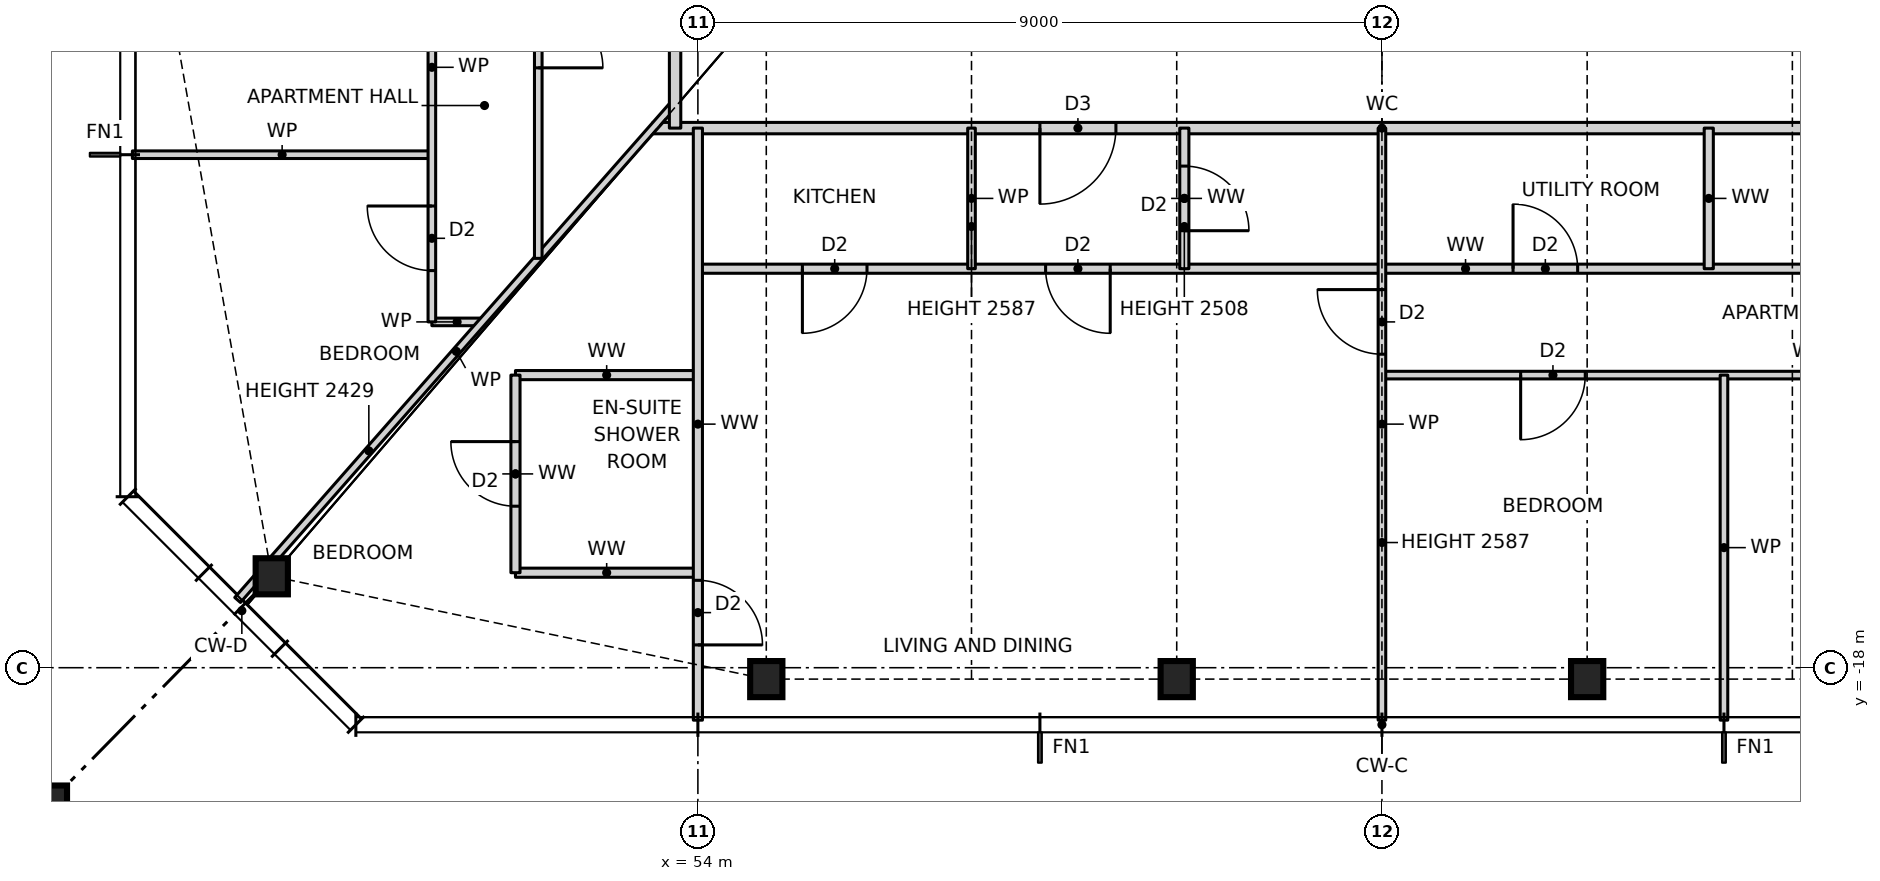
"""IFC4 building model, lengths in metres.
Left out: names, types, materials, properties, quantities, classifications, styles, units other than length and angle.
Written with IfcOpenShell. Run it as: python <this file> out.ifc"""

import sys

from ifc_helpers import new_model, si_unit, direction, frame, frame_2d, origin, origin_2d, place, context, subcontext, project, spatial, rectangle, hollow_rectangle, i_section, extrude, element, fill, save


model = new_model("IFC4")
c1 = context("Model", 3, precision=1e-05, world=origin(), true_north=direction((0.0, 1.0)))
c2 = subcontext(c1, "Body", "Model", "MODEL_VIEW")
j1 = project(units=[si_unit("LENGTHUNIT", "METRE"), si_unit("PLANEANGLEUNIT", "RADIAN")], contexts=[c1])
p1 = place(None, origin())
s1 = spatial("IfcSite", under=j1, at=p1, CompositionType="ELEMENT")
p2 = place(p1, origin())
s2 = spatial("IfcBuilding", under=s1, at=p2, CompositionType="ELEMENT")
p3 = place(p2, frame((0.0, 0.0, 22.0)))
s3 = spatial("IfcBuildingStorey", under=s2, at=p3, CompositionType="ELEMENT", Elevation=22.0)
for number, where, z_axis, x_axis in (
    (1, (48.394, -16.797, 0.0), (0.0, 0.0, 1.0), (1.0, 0.0, 0.0)),
    (2, (54.9, -18.15, 0.0), (0.0, 0.0, 1.0), (1.0, 0.0, 0.0)),
    (3, (60.3, -18.15, 0.0), (0.0, 0.0, 1.0), (1.0, 0.0, 0.0)),
    (4, (65.7, -18.15, 0.0), (0.0, 0.0, 1.0), (1.0, 0.0, 0.0)),
):
    element("IfcColumn", number, at=place(p3, frame(where, z_axis=z_axis, x_axis=x_axis)), inside=s3, PredefinedType="COLUMN", context=c2, shape_type="SweptSolid", body=[
        extrude(i_section(OverallWidth=0.424, OverallDepth=0.475, WebThickness=0.048, FlangeThickness=0.077, at=origin_2d()), origin(), (0.0, 0.0, 1.0), 3.5),
    ])
p4 = place(p3, frame((45.1, -20.15, 0.0), z_axis=(0.0, 0.0, 1.0), x_axis=(1.0, 0.0, 0.0)))
e5 = element("IfcColumn", 5, at=p4, inside=s3, PredefinedType="COLUMN", context=c2, shape_type="SweptSolid", body=[
    extrude(hollow_rectangle(XDim=1.2, YDim=1.2, WallThickness=0.07, at=origin_2d()), origin(), (0.0, 0.0, 1.0), 3.5),
])
for number, where, z_axis, x_axis in (
    (6, (51.6, -16.75, 0.0), (0.0, 0.0, 1.0), (1.0, 0.0, 0.0)),
    (7, (51.6, -14.15, 0.0), (0.0, 0.0, 1.0), (1.0, 0.0, 0.0)),
):
    element("IfcWall", number, at=place(p3, frame(where, z_axis=z_axis, x_axis=x_axis)), inside=s3, PredefinedType="PARTITIONING", context=c2, shape_type="SweptSolid", body=[
        extrude(rectangle(XDim=2.4, YDim=0.12, at=frame_2d((1.2, 0.0))), origin(), (0.0, 0.0, 1.0), 3.27),
    ])
p5 = place(p3, frame((63.0, -14.15, 0.0), z_axis=(0.0, 0.0, 1.0), x_axis=(1.0, 0.0, 0.0)))
e8 = element("IfcWall", 8, at=p5, inside=s3, PredefinedType="PARTITIONING", context=c2, shape_type="SweptSolid", body=[
    extrude(rectangle(XDim=11.2, YDim=0.1, at=frame_2d((5.6, 0.0))), origin(), (0.0, 0.0, 1.0), 3.27),
])
p6 = place(p5, frame((1.825, 0.0, 0.0)))
e9 = element("IfcOpeningElement", 9, at=p6, cuts=e8, PredefinedType="OPENING", context=c2, shape_type="SweptSolid", body=[
    extrude(rectangle(XDim=0.85, YDim=2.1, at=frame_2d((0.425, 1.05))), frame((0.0, 0.06, 0.0), z_axis=(0.0, -1.0, 0.0), x_axis=(1.0, 0.0, 0.0)), (0.0, 0.0, 1.0), 0.12),
])
p7 = place(p5, frame((6.325, 0.0, 0.0)))
e10 = element("IfcOpeningElement", 10, at=p7, cuts=e8, PredefinedType="OPENING", context=c2, shape_type="SweptSolid", body=[
    extrude(rectangle(XDim=0.85, YDim=2.1, at=frame_2d((0.425, 1.05))), frame((0.0, 0.06, 0.0), z_axis=(0.0, -1.0, 0.0), x_axis=(1.0, 0.0, 0.0)), (0.0, 0.0, 1.0), 0.12),
])
p8 = place(p5, frame((9.675, 0.0, 0.0)))
e11 = element("IfcOpeningElement", 11, at=p8, cuts=e8, PredefinedType="OPENING", context=c2, shape_type="SweptSolid", body=[
    extrude(rectangle(XDim=0.85, YDim=2.1, at=frame_2d((0.425, 1.05))), frame((0.0, 0.06, 0.0), z_axis=(0.0, -1.0, 0.0), x_axis=(1.0, 0.0, 0.0)), (0.0, 0.0, 1.0), 0.12),
])
p9 = place(p3, frame((50.5, -13.45, 0.0), z_axis=(0.0, 0.0, 1.0), x_axis=(1.0, 0.0, 0.0)))
e12 = element("IfcWall", 12, at=p9, inside=s3, PredefinedType="PARTITIONING", context=c2, shape_type="SweptSolid", body=[
    extrude(rectangle(XDim=0.664, YDim=0.1, at=frame_2d((0.332, 0.0))), origin(), (0.0, 0.0, 1.0), 3.27),
])
p10 = place(p3, frame((54.0, -12.75, 0.0), z_axis=(0.0, 0.0, 1.0), x_axis=(1.0, 0.0, 0.0)))
e13 = element("IfcWall", 13, at=p10, inside=s3, PredefinedType="PARTITIONING", context=c2, shape_type="SweptSolid", body=[
    extrude(rectangle(XDim=20.2, YDim=0.12, at=frame_2d((10.1, 0.0))), origin(), (0.0, 0.0, 1.0), 3.27),
])
p11 = place(p10, frame((1.375, 0.0, 0.0)))
e14 = element("IfcOpeningElement", 14, at=p11, cuts=e13, PredefinedType="OPENING", context=c2, shape_type="SweptSolid", body=[
    extrude(rectangle(XDim=0.85, YDim=2.1, at=frame_2d((0.425, 1.05))), frame((0.0, 0.07, 0.0), z_axis=(0.0, -1.0, 0.0), x_axis=(1.0, 0.0, 0.0)), (0.0, 0.0, 1.0), 0.14),
])
p12 = place(p10, frame((4.575, 0.0, 0.0)))
e15 = element("IfcOpeningElement", 15, at=p12, cuts=e13, PredefinedType="OPENING", context=c2, shape_type="SweptSolid", body=[
    extrude(rectangle(XDim=0.85, YDim=2.1, at=frame_2d((0.425, 1.05))), frame((0.0, 0.07, 0.0), z_axis=(0.0, -1.0, 0.0), x_axis=(1.0, 0.0, 0.0)), (0.0, 0.0, 1.0), 0.14),
])
p13 = place(p10, frame((10.725, 0.0, 0.0)))
e16 = element("IfcOpeningElement", 16, at=p13, cuts=e13, PredefinedType="OPENING", context=c2, shape_type="SweptSolid", body=[
    extrude(rectangle(XDim=0.85, YDim=2.1, at=frame_2d((0.425, 1.05))), frame((0.0, 0.07, 0.0), z_axis=(0.0, -1.0, 0.0), x_axis=(1.0, 0.0, 0.0)), (0.0, 0.0, 1.0), 0.14),
])
p14 = place(p10, frame((16.325, 0.0, 0.0)))
e17 = element("IfcOpeningElement", 17, at=p14, cuts=e13, PredefinedType="OPENING", context=c2, shape_type="SweptSolid", body=[
    extrude(rectangle(XDim=0.85, YDim=2.1, at=frame_2d((0.425, 1.05))), frame((0.0, 0.07, 0.0), z_axis=(0.0, -1.0, 0.0), x_axis=(1.0, 0.0, 0.0)), (0.0, 0.0, 1.0), 0.14),
])
p15 = place(p3, frame((46.56, -11.25, 0.0), z_axis=(0.0, 0.0, 1.0), x_axis=(1.0, 0.0, 0.0)))
e18 = element("IfcWall", 18, at=p15, inside=s3, PredefinedType="PARTITIONING", context=c2, shape_type="SweptSolid", body=[
    extrude(rectangle(XDim=3.94, YDim=0.1, at=frame_2d((1.97, 0.0))), origin(), (0.0, 0.0, 1.0), 3.27),
])
p16 = place(p3, frame((53.408, -10.9, 0.0), z_axis=(0.0, 0.0, 1.0), x_axis=(1.0, 0.0, 0.0)))
e19 = element("IfcWall", 19, at=p16, inside=s3, PredefinedType="PARTITIONING", context=c2, shape_type="SweptSolid", body=[
    extrude(rectangle(XDim=19.184, YDim=0.15, at=frame_2d((9.592, 0.0))), origin(), (0.0, 0.0, 1.0), 3.27),
])
p17 = place(p16, frame((5.092, 0.0, 0.0)))
e20 = element("IfcOpeningElement", 20, at=p17, cuts=e19, PredefinedType="OPENING", context=c2, shape_type="SweptSolid", body=[
    extrude(rectangle(XDim=1.0, YDim=2.1, at=frame_2d((0.5, 1.05))), frame((0.0, 0.085, 0.0), z_axis=(0.0, -1.0, 0.0), x_axis=(1.0, 0.0, 0.0)), (0.0, 0.0, 1.0), 0.17),
])
p18 = place(p3, frame((47.944, -17.109, 0.0), z_axis=(0.0, 0.0, 1.0), x_axis=(0.660612734851, 0.750726857487, 0.0)))
e21 = element("IfcWall", 21, at=p18, inside=s3, PredefinedType="PARTITIONING", context=c2, shape_type="SweptSolid", body=[
    extrude(rectangle(XDim=8.713, YDim=0.1, at=frame_2d((4.356, 0.0))), origin(), (0.0, 0.0, 1.0), 2.429),
])
p19 = place(p3, frame((67.5, -18.69, 0.0), z_axis=(0.0, 0.0, 1.0), x_axis=(0.0, 1.0, 0.0)))
e22 = element("IfcWall", 22, at=p19, inside=s3, PredefinedType="PARTITIONING", context=c2, shape_type="SweptSolid", body=[
    extrude(rectangle(XDim=4.54, YDim=0.1, at=frame_2d((2.27, 0.0))), origin(), (0.0, 0.0, 1.0), 3.27),
])
p20 = place(p3, frame((67.3, -12.75, 0.0), z_axis=(0.0, 0.0, 1.0), x_axis=(0.0, 1.0, 0.0)))
e23 = element("IfcWall", 23, at=p20, inside=s3, PredefinedType="PARTITIONING", context=c2, shape_type="SweptSolid", body=[
    extrude(rectangle(XDim=1.85, YDim=0.12, at=frame_2d((0.925, 0.0))), origin(), (0.0, 0.0, 1.0), 3.27),
])
p21 = place(p3, frame((63.0, -18.69, 0.0), z_axis=(0.0, 0.0, 1.0), x_axis=(0.0, 1.0, 0.0)))
e24 = element("IfcWall", 24, at=p21, inside=s3, PredefinedType="PARTITIONING", context=c2, shape_type="SweptSolid", body=[
    extrude(rectangle(XDim=7.79, YDim=0.1, at=frame_2d((3.895, 0.0))), origin(), (0.0, 0.0, 1.0), 2.587),
])
p22 = place(p21, frame((4.815, 0.0, 0.0)))
e25 = element("IfcOpeningElement", 25, at=p22, cuts=e24, PredefinedType="OPENING", context=c2, shape_type="SweptSolid", body=[
    extrude(rectangle(XDim=0.85, YDim=2.1, at=frame_2d((0.425, 1.05))), frame((0.0, 0.06, 0.0), z_axis=(0.0, -1.0, 0.0), x_axis=(1.0, 0.0, 0.0)), (0.0, 0.0, 1.0), 0.12),
])
p23 = place(p3, frame((60.4, -12.75, 0.0), z_axis=(0.0, 0.0, 1.0), x_axis=(0.0, 1.0, 0.0)))
e26 = element("IfcWall", 26, at=p23, inside=s3, PredefinedType="PARTITIONING", context=c2, shape_type="SweptSolid", body=[
    extrude(rectangle(XDim=1.85, YDim=0.12, at=frame_2d((0.925, 0.0))), origin(), (0.0, 0.0, 1.0), 2.508),
])
p24 = place(p23, frame((0.5, 0.0, 0.0)))
e27 = element("IfcOpeningElement", 27, at=p24, cuts=e26, PredefinedType="OPENING", context=c2, shape_type="SweptSolid", body=[
    extrude(rectangle(XDim=0.85, YDim=2.1, at=frame_2d((0.425, 1.05))), frame((0.0, 0.07, 0.0), z_axis=(0.0, -1.0, 0.0), x_axis=(1.0, 0.0, 0.0)), (0.0, 0.0, 1.0), 0.14),
])
p25 = place(p3, frame((57.6, -12.75, 0.0), z_axis=(0.0, 0.0, 1.0), x_axis=(0.0, 1.0, 0.0)))
e28 = element("IfcWall", 28, at=p25, inside=s3, PredefinedType="PARTITIONING", context=c2, shape_type="SweptSolid", body=[
    extrude(rectangle(XDim=1.85, YDim=0.1, at=frame_2d((0.925, 0.0))), origin(), (0.0, 0.0, 1.0), 2.587),
])
p26 = place(p3, frame((54.0, -18.69, 0.0), z_axis=(0.0, 0.0, 1.0), x_axis=(0.0, 1.0, 0.0)))
e29 = element("IfcWall", 29, at=p26, inside=s3, PredefinedType="PARTITIONING", context=c2, shape_type="SweptSolid", body=[
    extrude(rectangle(XDim=7.79, YDim=0.12, at=frame_2d((3.895, 0.0))), origin(), (0.0, 0.0, 1.0), 3.27),
])
p27 = place(p26, frame((0.99, 0.0, 0.0)))
e30 = element("IfcOpeningElement", 30, at=p27, cuts=e29, PredefinedType="OPENING", context=c2, shape_type="SweptSolid", body=[
    extrude(rectangle(XDim=0.85, YDim=2.1, at=frame_2d((0.425, 1.05))), frame((0.0, 0.07, 0.0), z_axis=(0.0, -1.0, 0.0), x_axis=(1.0, 0.0, 0.0)), (0.0, 0.0, 1.0), 0.14),
])
p28 = place(p3, frame((53.7, -10.9, 0.0), z_axis=(0.0, 0.0, 1.0), x_axis=(0.0, 1.0, 0.0)))
e31 = element("IfcWall", 31, at=p28, inside=s3, PredefinedType="PARTITIONING", context=c2, shape_type="SweptSolid", body=[
    extrude(rectangle(XDim=21.468, YDim=0.15, at=frame_2d((10.734, 0.0))), origin(), (0.0, 0.0, 1.0), 3.27),
])
p29 = place(p28, frame((7.65, 0.0, 0.0)))
e32 = element("IfcOpeningElement", 32, at=p29, cuts=e31, PredefinedType="OPENING", context=c2, shape_type="SweptSolid", body=[
    extrude(rectangle(XDim=1.0, YDim=2.1, at=frame_2d((0.5, 1.05))), frame((0.0, 0.085, 0.0), z_axis=(0.0, -1.0, 0.0), x_axis=(1.0, 0.0, 0.0)), (0.0, 0.0, 1.0), 0.17),
])
p30 = place(p3, frame((51.9, -12.614, 0.0), z_axis=(0.0, 0.0, 1.0), x_axis=(0.0, 1.0, 0.0)))
e33 = element("IfcWall", 33, at=p30, inside=s3, PredefinedType="PARTITIONING", context=c2, shape_type="SweptSolid", body=[
    extrude(rectangle(XDim=25.228, YDim=0.1, at=frame_2d((12.614, 0.0))), origin(), (0.0, 0.0, 1.0), 3.27),
])
p31 = place(p30, frame((12.639, 0.0, 0.0)))
e34 = element("IfcOpeningElement", 34, at=p31, cuts=e33, PredefinedType="OPENING", context=c2, shape_type="SweptSolid", body=[
    extrude(rectangle(XDim=0.85, YDim=2.1, at=frame_2d((0.425, 1.05))), frame((0.0, 0.06, 0.0), z_axis=(0.0, -1.0, 0.0), x_axis=(1.0, 0.0, 0.0)), (0.0, 0.0, 1.0), 0.12),
])
p32 = place(p30, frame((9.439, 0.0, 0.0)))
e35 = element("IfcOpeningElement", 35, at=p32, cuts=e33, PredefinedType="OPENING", context=c2, shape_type="SweptSolid", body=[
    extrude(rectangle(XDim=0.85, YDim=2.1, at=frame_2d((0.425, 1.05))), frame((0.0, 0.06, 0.0), z_axis=(0.0, -1.0, 0.0), x_axis=(1.0, 0.0, 0.0)), (0.0, 0.0, 1.0), 0.12),
])
p33 = place(p30, frame((16.639, 0.0, 0.0)))
e36 = element("IfcOpeningElement", 36, at=p33, cuts=e33, PredefinedType="OPENING", context=c2, shape_type="SweptSolid", body=[
    extrude(rectangle(XDim=0.85, YDim=2.1, at=frame_2d((0.425, 1.05))), frame((0.0, 0.06, 0.0), z_axis=(0.0, -1.0, 0.0), x_axis=(1.0, 0.0, 0.0)), (0.0, 0.0, 1.0), 0.12),
])
p34 = place(p30, frame((21.821, 0.0, 0.0)))
e37 = element("IfcOpeningElement", 37, at=p34, cuts=e33, PredefinedType="OPENING", context=c2, shape_type="SweptSolid", body=[
    extrude(rectangle(XDim=0.85, YDim=2.1, at=frame_2d((0.425, 1.05))), frame((0.0, 0.06, 0.0), z_axis=(0.0, -1.0, 0.0), x_axis=(1.0, 0.0, 0.0)), (0.0, 0.0, 1.0), 0.12),
])
p35 = place(p30, frame((2.507, 0.0, 0.0)))
e38 = element("IfcOpeningElement", 38, at=p35, cuts=e33, PredefinedType="OPENING", context=c2, shape_type="SweptSolid", body=[
    extrude(rectangle(XDim=0.85, YDim=2.1, at=frame_2d((0.425, 1.05))), frame((0.0, 0.06, 0.0), z_axis=(0.0, -1.0, 0.0), x_axis=(1.0, 0.0, 0.0)), (0.0, 0.0, 1.0), 0.12),
])
p36 = place(p3, frame((51.6, -16.75, 0.0), z_axis=(0.0, 0.0, 1.0), x_axis=(0.0, 1.0, 0.0)))
e39 = element("IfcWall", 39, at=p36, inside=s3, PredefinedType="PARTITIONING", context=c2, shape_type="SweptSolid", body=[
    extrude(rectangle(XDim=2.6, YDim=0.12, at=frame_2d((1.3, 0.0))), origin(), (0.0, 0.0, 1.0), 3.27),
])
p37 = place(p36, frame((0.875, 0.0, 0.0)))
e40 = element("IfcOpeningElement", 40, at=p37, cuts=e39, PredefinedType="OPENING", context=c2, shape_type="SweptSolid", body=[
    extrude(rectangle(XDim=0.85, YDim=2.1, at=frame_2d((0.425, 1.05))), frame((0.0, 0.07, 0.0), z_axis=(0.0, -1.0, 0.0), x_axis=(1.0, 0.0, 0.0)), (0.0, 0.0, 1.0), 0.14),
])
p38 = place(p3, frame((50.5, -13.45, 0.0), z_axis=(0.0, 0.0, 1.0), x_axis=(0.0, 1.0, 0.0)))
e41 = element("IfcWall", 41, at=p38, inside=s3, PredefinedType="PARTITIONING", context=c2, shape_type="SweptSolid", body=[
    extrude(rectangle(XDim=6.7, YDim=0.1, at=frame_2d((3.35, 0.0))), origin(), (0.0, 0.0, 1.0), 3.27),
])
p39 = place(p38, frame((4.025, 0.0, 0.0)))
e42 = element("IfcOpeningElement", 42, at=p39, cuts=e41, PredefinedType="OPENING", context=c2, shape_type="SweptSolid", body=[
    extrude(rectangle(XDim=0.85, YDim=2.1, at=frame_2d((0.425, 1.05))), frame((0.0, 0.06, 0.0), z_axis=(0.0, -1.0, 0.0), x_axis=(1.0, 0.0, 0.0)), (0.0, 0.0, 1.0), 0.12),
])
p40 = place(p38, frame((0.675, 0.0, 0.0)))
e43 = element("IfcOpeningElement", 43, at=p40, cuts=e41, PredefinedType="OPENING", context=c2, shape_type="SweptSolid", body=[
    extrude(rectangle(XDim=0.85, YDim=2.1, at=frame_2d((0.425, 1.05))), frame((0.0, 0.06, 0.0), z_axis=(0.0, -1.0, 0.0), x_axis=(1.0, 0.0, 0.0)), (0.0, 0.0, 1.0), 0.12),
])
p41 = place(p11, frame((0.85, 0.0, 0.0), z_axis=(0.0, 0.0, 1.0), x_axis=(-1.0, 0.0, 0.0)))
e44 = element("IfcDoor", 44, at=p41, inside=s3, OperationType="SINGLE_SWING_RIGHT", PredefinedType="DOOR", context=c2, shape_type="SweptSolid", body=[
    extrude(rectangle(XDim=0.85, YDim=2.1, at=frame_2d((0.425, 1.05))), frame((0.0, 0.025, 0.0), z_axis=(0.0, -1.0, 0.0), x_axis=(1.0, 0.0, 0.0)), (0.0, 0.0, 1.0), 0.05),
])
fill(e14, e44)
p42 = place(p17, frame((1.0, 0.0, 0.0), z_axis=(0.0, 0.0, 1.0), x_axis=(-1.0, 0.0, 0.0)))
e45 = element("IfcDoor", 45, at=p42, inside=s3, OperationType="SINGLE_SWING_RIGHT", PredefinedType="DOOR", context=c2, shape_type="SweptSolid", body=[
    extrude(rectangle(XDim=1.0, YDim=2.1, at=frame_2d((0.5, 1.05))), frame((0.0, 0.025, 0.0), z_axis=(0.0, -1.0, 0.0), x_axis=(1.0, 0.0, 0.0)), (0.0, 0.0, 1.0), 0.05),
])
fill(e20, e45)
p43 = place(p12, frame((0.85, 0.0, 0.0), z_axis=(0.0, 0.0, 1.0), x_axis=(-1.0, 0.0, 0.0)))
e46 = element("IfcDoor", 46, at=p43, inside=s3, OperationType="SINGLE_SWING_LEFT", PredefinedType="DOOR", context=c2, shape_type="SweptSolid", body=[
    extrude(rectangle(XDim=0.85, YDim=2.1, at=frame_2d((0.425, 1.05))), frame((0.0, 0.025, 0.0), z_axis=(0.0, -1.0, 0.0), x_axis=(1.0, 0.0, 0.0)), (0.0, 0.0, 1.0), 0.05),
])
fill(e15, e46)
p44 = place(p24, frame((0.85, 0.0, 0.0), z_axis=(0.0, 0.0, 1.0), x_axis=(-1.0, 0.0, 0.0)))
e47 = element("IfcDoor", 47, at=p44, inside=s3, OperationType="SINGLE_SWING_RIGHT", PredefinedType="DOOR", context=c2, shape_type="SweptSolid", body=[
    extrude(rectangle(XDim=0.85, YDim=2.1, at=frame_2d((0.425, 1.05))), frame((0.0, 0.025, 0.0), z_axis=(0.0, -1.0, 0.0), x_axis=(1.0, 0.0, 0.0)), (0.0, 0.0, 1.0), 0.05),
])
fill(e27, e47)
p45 = place(p37, origin())
e48 = element("IfcDoor", 48, at=p45, inside=s3, OperationType="SINGLE_SWING_RIGHT", PredefinedType="DOOR", context=c2, shape_type="SweptSolid", body=[
    extrude(rectangle(XDim=0.85, YDim=2.1, at=frame_2d((0.425, 1.05))), frame((0.0, 0.025, 0.0), z_axis=(0.0, -1.0, 0.0), x_axis=(1.0, 0.0, 0.0)), (0.0, 0.0, 1.0), 0.05),
])
fill(e40, e48)
p46 = place(p27, frame((0.85, 0.0, 0.0), z_axis=(0.0, 0.0, 1.0), x_axis=(-1.0, 0.0, 0.0)))
e49 = element("IfcDoor", 49, at=p46, inside=s3, OperationType="SINGLE_SWING_RIGHT", PredefinedType="DOOR", context=c2, shape_type="SweptSolid", body=[
    extrude(rectangle(XDim=0.85, YDim=2.1, at=frame_2d((0.425, 1.05))), frame((0.0, 0.025, 0.0), z_axis=(0.0, -1.0, 0.0), x_axis=(1.0, 0.0, 0.0)), (0.0, 0.0, 1.0), 0.05),
])
fill(e30, e49)
p47 = place(p22, origin())
e50 = element("IfcDoor", 50, at=p47, inside=s3, OperationType="SINGLE_SWING_RIGHT", PredefinedType="DOOR", context=c2, shape_type="SweptSolid", body=[
    extrude(rectangle(XDim=0.85, YDim=2.1, at=frame_2d((0.425, 1.05))), frame((0.0, 0.025, 0.0), z_axis=(0.0, -1.0, 0.0), x_axis=(1.0, 0.0, 0.0)), (0.0, 0.0, 1.0), 0.05),
])
fill(e25, e50)
p48 = place(p6, frame((0.85, 0.0, 0.0), z_axis=(0.0, 0.0, 1.0), x_axis=(-1.0, 0.0, 0.0)))
e51 = element("IfcDoor", 51, at=p48, inside=s3, OperationType="SINGLE_SWING_RIGHT", PredefinedType="DOOR", context=c2, shape_type="SweptSolid", body=[
    extrude(rectangle(XDim=0.85, YDim=2.1, at=frame_2d((0.425, 1.05))), frame((0.0, 0.025, 0.0), z_axis=(0.0, -1.0, 0.0), x_axis=(1.0, 0.0, 0.0)), (0.0, 0.0, 1.0), 0.05),
])
fill(e9, e51)
p49 = place(p13, origin())
e52 = element("IfcDoor", 52, at=p49, inside=s3, OperationType="SINGLE_SWING_LEFT", PredefinedType="DOOR", context=c2, shape_type="SweptSolid", body=[
    extrude(rectangle(XDim=0.85, YDim=2.1, at=frame_2d((0.425, 1.05))), frame((0.0, 0.025, 0.0), z_axis=(0.0, -1.0, 0.0), x_axis=(1.0, 0.0, 0.0)), (0.0, 0.0, 1.0), 0.05),
])
fill(e16, e52)
p50 = place(p40, origin())
e53 = element("IfcDoor", 53, at=p50, inside=s3, OperationType="SINGLE_SWING_RIGHT", PredefinedType="DOOR", context=c2, shape_type="SweptSolid", body=[
    extrude(rectangle(XDim=0.85, YDim=2.1, at=frame_2d((0.425, 1.05))), frame((0.0, 0.025, 0.0), z_axis=(0.0, -1.0, 0.0), x_axis=(1.0, 0.0, 0.0)), (0.0, 0.0, 1.0), 0.05),
])
fill(e43, e53)
p51 = place(p35, frame((0.85, 0.0, 0.0), z_axis=(0.0, 0.0, 1.0), x_axis=(-1.0, 0.0, 0.0)))
e54 = element("IfcDoor", 54, at=p51, inside=s3, OperationType="SINGLE_SWING_RIGHT", PredefinedType="DOOR", context=c2, shape_type="SweptSolid", body=[
    extrude(rectangle(XDim=0.85, YDim=2.1, at=frame_2d((0.425, 1.05))), frame((0.0, 0.025, 0.0), z_axis=(0.0, -1.0, 0.0), x_axis=(1.0, 0.0, 0.0)), (0.0, 0.0, 1.0), 0.05),
])
fill(e38, e54)
save(model, sys.argv[1])
